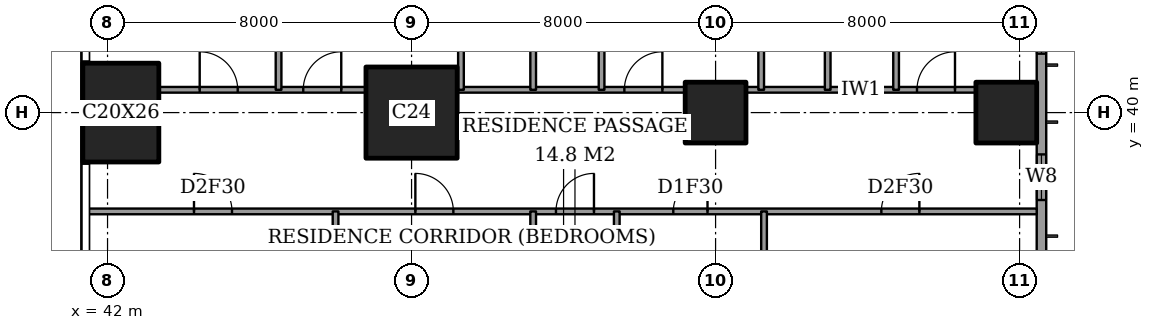
"""IFC4 building model, lengths in metres.
Left out: names, types, materials, properties, quantities, classifications, styles, units other than length and angle.
Written with IfcOpenShell. Run it as: python <this file> out.ifc"""

import sys

from ifc_helpers import new_model, si_unit, direction, frame, frame_2d, origin, origin_2d, place, context, subcontext, project, spatial, rectangle, extrude, element, fill, save


model = new_model("IFC4")
c1 = context("Model", 3, precision=1e-05, world=origin(), true_north=direction((0.0, 1.0)))
c2 = subcontext(c1, "Body", "Model", "MODEL_VIEW")
j1 = project(units=[si_unit("LENGTHUNIT", "METRE"), si_unit("PLANEANGLEUNIT", "RADIAN")], contexts=[c1])
p1 = place(None, origin())
s1 = spatial("IfcSite", under=j1, at=p1, CompositionType="ELEMENT")
p2 = place(p1, origin())
s2 = spatial("IfcBuilding", under=s1, at=p2, CompositionType="ELEMENT")
p3 = place(p2, frame((0.0, 0.0, 273.6)))
s3 = spatial("IfcBuildingStorey", under=s2, at=p3, CompositionType="ELEMENT", Elevation=273.6)
p4 = place(p3, frame((42.35, 40.0, 0.0), z_axis=(0.0, 0.0, 1.0), x_axis=(1.0, 0.0, 0.0)))
e1 = element("IfcColumn", 1, at=p4, inside=s3, PredefinedType="COLUMN", context=c2, shape_type="SweptSolid", body=[
    extrude(rectangle(XDim=2.0, YDim=2.6, at=origin_2d()), origin(), (0.0, 0.0, 1.0), 3.6),
])
p5 = place(p3, frame((50.0, 40.0, 0.0), z_axis=(0.0, 0.0, 1.0), x_axis=(1.0, 0.0, 0.0)))
e2 = element("IfcColumn", 2, at=p5, inside=s3, PredefinedType="COLUMN", context=c2, shape_type="SweptSolid", body=[
    extrude(rectangle(XDim=2.4, YDim=2.4, at=origin_2d()), origin(), (0.0, 0.0, 1.0), 3.6),
])
for number, where, z_axis, x_axis in (
    (3, (58.0, 40.0, 0.0), (0.0, 0.0, 1.0), (1.0, 0.0, 0.0)),
    (4, (65.65, 40.0, 0.0), (0.0, 0.0, 1.0), (1.0, 0.0, 0.0)),
):
    element("IfcColumn", number, at=place(p3, frame(where, z_axis=z_axis, x_axis=x_axis)), inside=s3, PredefinedType="COLUMN", context=c2, shape_type="SweptSolid", body=[
        extrude(rectangle(XDim=1.6, YDim=1.6, at=origin_2d()), origin(), (0.0, 0.0, 1.0), 3.6),
    ])
p6 = place(p3, frame((66.575, 3.175, 0.0), z_axis=(0.0, 0.0, 1.0), x_axis=(0.0, 1.0, 0.0)))
e5 = element("IfcWall", 5, at=p6, inside=s3, PredefinedType="SOLIDWALL", context=c2, shape_type="SweptSolid", body=[
    extrude(rectangle(XDim=41.65, YDim=0.25, at=frame_2d((20.825, 0.0))), origin(), (0.0, 0.0, 1.0), 3.6),
])
p7 = place(p6, frame((0.875, 0.0, 0.6)))
e6 = element("IfcOpeningElement", 6, at=p7, cuts=e5, PredefinedType="OPENING", context=c2, shape_type="SweptSolid", body=[
    extrude(rectangle(XDim=2.4, YDim=2.0, at=frame_2d((1.2, 1.0))), frame((0.0, 0.135, 0.0), z_axis=(0.0, -1.0, 0.0), x_axis=(1.0, 0.0, 0.0)), (0.0, 0.0, 1.0), 0.27),
])
p8 = place(p6, frame((6.0, 0.0, 0.6)))
e7 = element("IfcOpeningElement", 7, at=p8, cuts=e5, PredefinedType="OPENING", context=c2, shape_type="SweptSolid", body=[
    extrude(rectangle(XDim=1.2, YDim=2.0, at=frame_2d((0.6, 1.0))), frame((0.0, 0.135, 0.0), z_axis=(0.0, -1.0, 0.0), x_axis=(1.0, 0.0, 0.0)), (0.0, 0.0, 1.0), 0.27),
])
p9 = place(p6, frame((8.525, 0.0, 0.6)))
e8 = element("IfcOpeningElement", 8, at=p9, cuts=e5, PredefinedType="OPENING", context=c2, shape_type="SweptSolid", body=[
    extrude(rectangle(XDim=2.4, YDim=2.0, at=frame_2d((1.2, 1.0))), frame((0.0, 0.135, 0.0), z_axis=(0.0, -1.0, 0.0), x_axis=(1.0, 0.0, 0.0)), (0.0, 0.0, 1.0), 0.27),
])
p10 = place(p6, frame((15.725, 0.0, 0.6)))
e9 = element("IfcOpeningElement", 9, at=p10, cuts=e5, PredefinedType="OPENING", context=c2, shape_type="SweptSolid", body=[
    extrude(rectangle(XDim=2.4, YDim=2.0, at=frame_2d((1.2, 1.0))), frame((0.0, 0.135, 0.0), z_axis=(0.0, -1.0, 0.0), x_axis=(1.0, 0.0, 0.0)), (0.0, 0.0, 1.0), 0.27),
])
p11 = place(p6, frame((23.625, 0.0, 0.6)))
e10 = element("IfcOpeningElement", 10, at=p11, cuts=e5, PredefinedType="OPENING", context=c2, shape_type="SweptSolid", body=[
    extrude(rectangle(XDim=2.4, YDim=2.0, at=frame_2d((1.2, 1.0))), frame((0.0, 0.135, 0.0), z_axis=(0.0, -1.0, 0.0), x_axis=(1.0, 0.0, 0.0)), (0.0, 0.0, 1.0), 0.27),
])
p12 = place(p6, frame((30.725, 0.0, 0.6)))
e11 = element("IfcOpeningElement", 11, at=p12, cuts=e5, PredefinedType="OPENING", context=c2, shape_type="SweptSolid", body=[
    extrude(rectangle(XDim=2.4, YDim=2.0, at=frame_2d((1.2, 1.0))), frame((0.0, 0.135, 0.0), z_axis=(0.0, -1.0, 0.0), x_axis=(1.0, 0.0, 0.0)), (0.0, 0.0, 1.0), 0.27),
])
p13 = place(p6, frame((34.525, 0.0, 0.6)))
e12 = element("IfcOpeningElement", 12, at=p13, cuts=e5, PredefinedType="OPENING", context=c2, shape_type="SweptSolid", body=[
    extrude(rectangle(XDim=1.2, YDim=2.0, at=frame_2d((0.6, 1.0))), frame((0.0, 0.135, 0.0), z_axis=(0.0, -1.0, 0.0), x_axis=(1.0, 0.0, 0.0)), (0.0, 0.0, 1.0), 0.27),
])
p14 = place(p6, frame((38.375, 0.0, 0.6)))
e13 = element("IfcOpeningElement", 13, at=p14, cuts=e5, PredefinedType="OPENING", context=c2, shape_type="SweptSolid", body=[
    extrude(rectangle(XDim=2.4, YDim=2.0, at=frame_2d((1.2, 1.0))), frame((0.0, 0.135, 0.0), z_axis=(0.0, -1.0, 0.0), x_axis=(1.0, 0.0, 0.0)), (0.0, 0.0, 1.0), 0.27),
])
p15 = place(p3, frame((41.439, 37.4, 0.0), z_axis=(0.0, 0.0, 1.0), x_axis=(1.0, 0.0, 0.0)))
e14 = element("IfcWall", 14, at=p15, inside=s3, PredefinedType="PARTITIONING", context=c2, shape_type="SweptSolid", body=[
    extrude(rectangle(XDim=25.011, YDim=0.15, at=frame_2d((12.505, 0.0))), origin(), (0.0, 0.0, 1.0), 3.25),
])
p16 = place(p15, frame((12.361, 0.0, 0.0)))
e15 = element("IfcOpeningElement", 15, at=p16, cuts=e14, PredefinedType="OPENING", context=c2, shape_type="SweptSolid", body=[
    extrude(rectangle(XDim=1.0, YDim=2.1, at=frame_2d((0.5, 1.05))), frame((0.0, 0.085, 0.0), z_axis=(0.0, -1.0, 0.0), x_axis=(1.0, 0.0, 0.0)), (0.0, 0.0, 1.0), 0.17),
])
p17 = place(p15, frame((20.924, 0.0, 0.0)))
e16 = element("IfcOpeningElement", 16, at=p17, cuts=e14, PredefinedType="OPENING", context=c2, shape_type="SweptSolid", body=[
    extrude(rectangle(XDim=1.0, YDim=2.1, at=frame_2d((0.5, 1.05))), frame((0.0, 0.085, 0.0), z_axis=(0.0, -1.0, 0.0), x_axis=(1.0, 0.0, 0.0)), (0.0, 0.0, 1.0), 0.17),
])
p18 = place(p15, frame((15.448, 0.0, 0.0)))
e17 = element("IfcOpeningElement", 17, at=p18, cuts=e14, PredefinedType="OPENING", context=c2, shape_type="SweptSolid", body=[
    extrude(rectangle(XDim=0.9, YDim=2.1, at=frame_2d((0.45, 1.05))), frame((0.0, 0.085, 0.0), z_axis=(0.0, -1.0, 0.0), x_axis=(1.0, 0.0, 0.0)), (0.0, 0.0, 1.0), 0.17),
])
p19 = place(p15, frame((8.661, 0.0, 0.0)))
e18 = element("IfcOpeningElement", 18, at=p19, cuts=e14, PredefinedType="OPENING", context=c2, shape_type="SweptSolid", body=[
    extrude(rectangle(XDim=1.0, YDim=2.1, at=frame_2d((0.5, 1.05))), frame((0.0, 0.085, 0.0), z_axis=(0.0, -1.0, 0.0), x_axis=(1.0, 0.0, 0.0)), (0.0, 0.0, 1.0), 0.17),
])
p20 = place(p15, frame((2.836, 0.0, 0.0)))
e19 = element("IfcOpeningElement", 19, at=p20, cuts=e14, PredefinedType="OPENING", context=c2, shape_type="SweptSolid", body=[
    extrude(rectangle(XDim=1.0, YDim=2.1, at=frame_2d((0.5, 1.05))), frame((0.0, 0.085, 0.0), z_axis=(0.0, -1.0, 0.0), x_axis=(1.0, 0.0, 0.0)), (0.0, 0.0, 1.0), 0.17),
])
p21 = place(p3, frame((43.35, 40.6, 0.0), z_axis=(0.0, 0.0, 1.0), x_axis=(1.0, 0.0, 0.0)))
e20 = element("IfcWall", 20, at=p21, inside=s3, PredefinedType="PARTITIONING", context=c2, shape_type="SweptSolid", body=[
    extrude(rectangle(XDim=5.45, YDim=0.15, at=frame_2d((2.725, 0.0))), origin(), (0.0, 0.0, 1.0), 3.25),
])
p22 = place(p21, frame((3.8, 0.0, 0.0)))
e21 = element("IfcOpeningElement", 21, at=p22, cuts=e20, PredefinedType="OPENING", context=c2, shape_type="SweptSolid", body=[
    extrude(rectangle(XDim=1.0, YDim=2.1, at=frame_2d((0.5, 1.05))), frame((0.0, 0.085, 0.0), z_axis=(0.0, -1.0, 0.0), x_axis=(1.0, 0.0, 0.0)), (0.0, 0.0, 1.0), 0.17),
])
p23 = place(p21, frame((1.075, 0.0, 0.0)))
e22 = element("IfcOpeningElement", 22, at=p23, cuts=e20, PredefinedType="OPENING", context=c2, shape_type="SweptSolid", body=[
    extrude(rectangle(XDim=1.0, YDim=2.1, at=frame_2d((0.5, 1.05))), frame((0.0, 0.085, 0.0), z_axis=(0.0, -1.0, 0.0), x_axis=(1.0, 0.0, 0.0)), (0.0, 0.0, 1.0), 0.17),
])
p24 = place(p3, frame((51.2, 40.6, 0.0), z_axis=(0.0, 0.0, 1.0), x_axis=(1.0, 0.0, 0.0)))
e23 = element("IfcWall", 23, at=p24, inside=s3, PredefinedType="PARTITIONING", context=c2, shape_type="SweptSolid", body=[
    extrude(rectangle(XDim=6.0, YDim=0.15, at=frame_2d((3.0, 0.0))), origin(), (0.0, 0.0, 1.0), 3.25),
])
p25 = place(p24, frame((4.4, 0.0, 0.0)))
e24 = element("IfcOpeningElement", 24, at=p25, cuts=e23, PredefinedType="OPENING", context=c2, shape_type="SweptSolid", body=[
    extrude(rectangle(XDim=1.0, YDim=2.1, at=frame_2d((0.5, 1.05))), frame((0.0, 0.085, 0.0), z_axis=(0.0, -1.0, 0.0), x_axis=(1.0, 0.0, 0.0)), (0.0, 0.0, 1.0), 0.17),
])
p26 = place(p3, frame((58.8, 40.6, 0.0), z_axis=(0.0, 0.0, 1.0), x_axis=(1.0, 0.0, 0.0)))
e25 = element("IfcWall", 25, at=p26, inside=s3, PredefinedType="PARTITIONING", context=c2, shape_type="SweptSolid", body=[
    extrude(rectangle(XDim=6.05, YDim=0.15, at=frame_2d((3.025, 0.0))), origin(), (0.0, 0.0, 1.0), 3.25),
])
p27 = place(p26, frame((4.5, 0.0, 0.0)))
e26 = element("IfcOpeningElement", 26, at=p27, cuts=e25, PredefinedType="OPENING", context=c2, shape_type="SweptSolid", body=[
    extrude(rectangle(XDim=1.0, YDim=2.1, at=frame_2d((0.5, 1.05))), frame((0.0, 0.085, 0.0), z_axis=(0.0, -1.0, 0.0), x_axis=(1.0, 0.0, 0.0)), (0.0, 0.0, 1.0), 0.17),
])
p28 = place(p3, frame((46.5, 40.6, 0.0), z_axis=(0.0, 0.0, 1.0), x_axis=(0.0, 1.0, 0.0)))
e27 = element("IfcWall", 27, at=p28, inside=s3, PredefinedType="PARTITIONING", context=c2, shape_type="SweptSolid", body=[
    extrude(rectangle(XDim=7.85, YDim=0.15, at=frame_2d((3.925, 0.0))), origin(), (0.0, 0.0, 1.0), 3.25),
])
p29 = place(p3, frame((48.0, 28.0, 0.0), z_axis=(0.0, 0.0, 1.0), x_axis=(0.0, 1.0, 0.0)))
e28 = element("IfcWall", 28, at=p29, inside=s3, PredefinedType="PARTITIONING", context=c2, shape_type="SweptSolid", body=[
    extrude(rectangle(XDim=9.4, YDim=0.15, at=frame_2d((4.7, 0.0))), origin(), (0.0, 0.0, 1.0), 3.25),
])
p30 = place(p29, frame((0.837, 0.0, 0.0)))
e29 = element("IfcOpeningElement", 29, at=p30, cuts=e28, PredefinedType="OPENING", context=c2, shape_type="SweptSolid", body=[
    extrude(rectangle(XDim=1.0, YDim=2.1, at=frame_2d((0.5, 1.05))), frame((0.0, 0.085, 0.0), z_axis=(0.0, -1.0, 0.0), x_axis=(1.0, 0.0, 0.0)), (0.0, 0.0, 1.0), 0.17),
])
p31 = place(p3, frame((51.3, 40.6, 0.0), z_axis=(0.0, 0.0, 1.0), x_axis=(0.0, 1.0, 0.0)))
e30 = element("IfcWall", 30, at=p31, inside=s3, PredefinedType="PARTITIONING", context=c2, shape_type="SweptSolid", body=[
    extrude(rectangle(XDim=7.85, YDim=0.15, at=frame_2d((3.925, 0.0))), origin(), (0.0, 0.0, 1.0), 3.25),
])
p32 = place(p31, frame((3.475, 0.0, 0.0)))
e31 = element("IfcOpeningElement", 31, at=p32, cuts=e30, PredefinedType="OPENING", context=c2, shape_type="SweptSolid", body=[
    extrude(rectangle(XDim=0.9, YDim=2.1, at=frame_2d((0.45, 1.05))), frame((0.0, 0.085, 0.0), z_axis=(0.0, -1.0, 0.0), x_axis=(1.0, 0.0, 0.0)), (0.0, 0.0, 1.0), 0.17),
])
p33 = place(p3, frame((53.2, 30.675, 0.0), z_axis=(0.0, 0.0, 1.0), x_axis=(0.0, 1.0, 0.0)))
e32 = element("IfcWall", 32, at=p33, inside=s3, PredefinedType="PARTITIONING", context=c2, shape_type="SweptSolid", body=[
    extrude(rectangle(XDim=6.725, YDim=0.15, at=frame_2d((3.362, 0.0))), origin(), (0.0, 0.0, 1.0), 3.25),
])
p34 = place(p3, frame((53.2, 40.6, 0.0), z_axis=(0.0, 0.0, 1.0), x_axis=(0.0, 1.0, 0.0)))
e33 = element("IfcWall", 33, at=p34, inside=s3, PredefinedType="PARTITIONING", context=c2, shape_type="SweptSolid", body=[
    extrude(rectangle(XDim=7.85, YDim=0.15, at=frame_2d((3.925, 0.0))), origin(), (0.0, 0.0, 1.0), 3.25),
])
p35 = place(p3, frame((55.0, 40.6, 0.0), z_axis=(0.0, 0.0, 1.0), x_axis=(0.0, 1.0, 0.0)))
e34 = element("IfcWall", 34, at=p35, inside=s3, PredefinedType="PARTITIONING", context=c2, shape_type="SweptSolid", body=[
    extrude(rectangle(XDim=7.85, YDim=0.15, at=frame_2d((3.925, 0.0))), origin(), (0.0, 0.0, 1.0), 3.25),
])
p36 = place(p35, frame((3.475, 0.0, 0.0)))
e35 = element("IfcOpeningElement", 35, at=p36, cuts=e34, PredefinedType="OPENING", context=c2, shape_type="SweptSolid", body=[
    extrude(rectangle(XDim=0.9, YDim=2.1, at=frame_2d((0.45, 1.05))), frame((0.0, 0.085, 0.0), z_axis=(0.0, -1.0, 0.0), x_axis=(1.0, 0.0, 0.0)), (0.0, 0.0, 1.0), 0.17),
])
p37 = place(p3, frame((55.4, 28.0, 0.0), z_axis=(0.0, 0.0, 1.0), x_axis=(0.0, 1.0, 0.0)))
e36 = element("IfcWall", 36, at=p37, inside=s3, PredefinedType="PARTITIONING", context=c2, shape_type="SweptSolid", body=[
    extrude(rectangle(XDim=9.4, YDim=0.15, at=frame_2d((4.7, 0.0))), origin(), (0.0, 0.0, 1.0), 3.25),
])
p38 = place(p37, frame((0.837, 0.0, 0.0)))
e37 = element("IfcOpeningElement", 37, at=p38, cuts=e36, PredefinedType="OPENING", context=c2, shape_type="SweptSolid", body=[
    extrude(rectangle(XDim=1.0, YDim=2.1, at=frame_2d((0.5, 1.05))), frame((0.0, 0.085, 0.0), z_axis=(0.0, -1.0, 0.0), x_axis=(1.0, 0.0, 0.0)), (0.0, 0.0, 1.0), 0.17),
])
p39 = place(p3, frame((59.2, 40.6, 0.0), z_axis=(0.0, 0.0, 1.0), x_axis=(0.0, 1.0, 0.0)))
e38 = element("IfcWall", 38, at=p39, inside=s3, PredefinedType="PARTITIONING", context=c2, shape_type="SweptSolid", body=[
    extrude(rectangle(XDim=7.85, YDim=0.15, at=frame_2d((3.925, 0.0))), origin(), (0.0, 0.0, 1.0), 3.25),
])
p40 = place(p3, frame((59.275, 33.2, 0.0), z_axis=(0.0, 0.0, 1.0), x_axis=(0.0, 1.0, 0.0)))
e39 = element("IfcWall", 39, at=p40, inside=s3, PredefinedType="PARTITIONING", context=c2, shape_type="SweptSolid", body=[
    extrude(rectangle(XDim=4.2, YDim=0.15, at=frame_2d((2.1, 0.0))), origin(), (0.0, 0.0, 1.0), 3.25),
])
p41 = place(p3, frame((60.95, 40.6, 0.0), z_axis=(0.0, 0.0, 1.0), x_axis=(0.0, 1.0, 0.0)))
e40 = element("IfcWall", 40, at=p41, inside=s3, PredefinedType="PARTITIONING", context=c2, shape_type="SweptSolid", body=[
    extrude(rectangle(XDim=7.85, YDim=0.15, at=frame_2d((3.925, 0.0))), origin(), (0.0, 0.0, 1.0), 3.25),
])
p42 = place(p41, frame((5.225, 0.0, 0.0)))
e41 = element("IfcOpeningElement", 41, at=p42, cuts=e40, PredefinedType="OPENING", context=c2, shape_type="SweptSolid", body=[
    extrude(rectangle(XDim=0.9, YDim=2.1, at=frame_2d((0.45, 1.05))), frame((0.0, 0.085, 0.0), z_axis=(0.0, -1.0, 0.0), x_axis=(1.0, 0.0, 0.0)), (0.0, 0.0, 1.0), 0.17),
])
p43 = place(p3, frame((62.75, 40.6, 0.0), z_axis=(0.0, 0.0, 1.0), x_axis=(0.0, 1.0, 0.0)))
e42 = element("IfcWall", 42, at=p43, inside=s3, PredefinedType="PARTITIONING", context=c2, shape_type="SweptSolid", body=[
    extrude(rectangle(XDim=3.5, YDim=0.15, at=frame_2d((1.75, 0.0))), origin(), (0.0, 0.0, 1.0), 3.25),
])
p44 = place(p43, frame((1.3, 0.0, 0.0)))
e43 = element("IfcOpeningElement", 43, at=p44, cuts=e42, PredefinedType="OPENING", context=c2, shape_type="SweptSolid", body=[
    extrude(rectangle(XDim=0.9, YDim=2.1, at=frame_2d((0.45, 1.05))), frame((0.0, 0.085, 0.0), z_axis=(0.0, -1.0, 0.0), x_axis=(1.0, 0.0, 0.0)), (0.0, 0.0, 1.0), 0.17),
])
p45 = place(p13, origin())
e44 = element("IfcWindow", 44, at=p45, inside=s3, PartitioningType="SINGLE_PANEL", PredefinedType="WINDOW", context=c2, shape_type="SweptSolid", body=[
    extrude(rectangle(XDim=1.2, YDim=2.0, at=frame_2d((0.6, 1.0))), frame((0.0, 0.03, 0.0), z_axis=(0.0, -1.0, 0.0), x_axis=(1.0, 0.0, 0.0)), (0.0, 0.0, 1.0), 0.06),
])
fill(e12, e44)
p46 = place(p14, origin())
e45 = element("IfcWindow", 45, at=p46, inside=s3, PartitioningType="SINGLE_PANEL", PredefinedType="WINDOW", context=c2, shape_type="SweptSolid", body=[
    extrude(rectangle(XDim=2.4, YDim=2.0, at=frame_2d((1.2, 1.0))), frame((0.0, 0.03, 0.0), z_axis=(0.0, -1.0, 0.0), x_axis=(1.0, 0.0, 0.0)), (0.0, 0.0, 1.0), 0.06),
])
fill(e13, e45)
p47 = place(p27, origin())
e46 = element("IfcDoor", 46, at=p47, inside=s3, OperationType="SINGLE_SWING_LEFT", PredefinedType="DOOR", context=c2, shape_type="SweptSolid", body=[
    extrude(rectangle(XDim=1.0, YDim=2.1, at=frame_2d((0.5, 1.05))), frame((0.0, 0.025, 0.0), z_axis=(0.0, -1.0, 0.0), x_axis=(1.0, 0.0, 0.0)), (0.0, 0.0, 1.0), 0.05),
])
fill(e26, e46)
p48 = place(p25, origin())
e47 = element("IfcDoor", 47, at=p48, inside=s3, OperationType="SINGLE_SWING_LEFT", PredefinedType="DOOR", context=c2, shape_type="SweptSolid", body=[
    extrude(rectangle(XDim=1.0, YDim=2.1, at=frame_2d((0.5, 1.05))), frame((0.0, 0.025, 0.0), z_axis=(0.0, -1.0, 0.0), x_axis=(1.0, 0.0, 0.0)), (0.0, 0.0, 1.0), 0.05),
])
fill(e24, e47)
p49 = place(p22, origin())
e48 = element("IfcDoor", 48, at=p49, inside=s3, OperationType="SINGLE_SWING_LEFT", PredefinedType="DOOR", context=c2, shape_type="SweptSolid", body=[
    extrude(rectangle(XDim=1.0, YDim=2.1, at=frame_2d((0.5, 1.05))), frame((0.0, 0.025, 0.0), z_axis=(0.0, -1.0, 0.0), x_axis=(1.0, 0.0, 0.0)), (0.0, 0.0, 1.0), 0.05),
])
fill(e21, e48)
p50 = place(p23, origin())
e49 = element("IfcDoor", 49, at=p50, inside=s3, OperationType="SINGLE_SWING_RIGHT", PredefinedType="DOOR", context=c2, shape_type="SweptSolid", body=[
    extrude(rectangle(XDim=1.0, YDim=2.1, at=frame_2d((0.5, 1.05))), frame((0.0, 0.025, 0.0), z_axis=(0.0, -1.0, 0.0), x_axis=(1.0, 0.0, 0.0)), (0.0, 0.0, 1.0), 0.05),
])
fill(e22, e49)
p51 = place(p16, origin())
e50 = element("IfcDoor", 50, at=p51, inside=s3, OperationType="SINGLE_SWING_LEFT", PredefinedType="DOOR", context=c2, shape_type="SweptSolid", body=[
    extrude(rectangle(XDim=1.0, YDim=2.1, at=frame_2d((0.5, 1.05))), frame((0.0, 0.025, 0.0), z_axis=(0.0, -1.0, 0.0), x_axis=(1.0, 0.0, 0.0)), (0.0, 0.0, 1.0), 0.05),
])
fill(e15, e50)
p52 = place(p17, origin())
e51 = element("IfcDoor", 51, at=p52, inside=s3, OperationType="SINGLE_SWING_LEFT", PredefinedType="DOOR", context=c2, shape_type="SweptSolid", body=[
    extrude(rectangle(XDim=1.0, YDim=2.1, at=frame_2d((0.5, 1.05))), frame((0.0, 0.025, 0.0), z_axis=(0.0, -1.0, 0.0), x_axis=(1.0, 0.0, 0.0)), (0.0, 0.0, 1.0), 0.05),
])
fill(e16, e51)
p53 = place(p18, origin())
e52 = element("IfcDoor", 52, at=p53, inside=s3, OperationType="SINGLE_SWING_LEFT", PredefinedType="DOOR", context=c2, shape_type="SweptSolid", body=[
    extrude(rectangle(XDim=0.9, YDim=2.1, at=frame_2d((0.45, 1.05))), frame((0.0, 0.025, 0.0), z_axis=(0.0, -1.0, 0.0), x_axis=(1.0, 0.0, 0.0)), (0.0, 0.0, 1.0), 0.05),
])
fill(e17, e52)
p54 = place(p19, origin())
e53 = element("IfcDoor", 53, at=p54, inside=s3, OperationType="SINGLE_SWING_RIGHT", PredefinedType="DOOR", context=c2, shape_type="SweptSolid", body=[
    extrude(rectangle(XDim=1.0, YDim=2.1, at=frame_2d((0.5, 1.05))), frame((0.0, 0.025, 0.0), z_axis=(0.0, -1.0, 0.0), x_axis=(1.0, 0.0, 0.0)), (0.0, 0.0, 1.0), 0.05),
])
fill(e18, e53)
p55 = place(p20, origin())
e54 = element("IfcDoor", 54, at=p55, inside=s3, OperationType="SINGLE_SWING_RIGHT", PredefinedType="DOOR", context=c2, shape_type="SweptSolid", body=[
    extrude(rectangle(XDim=1.0, YDim=2.1, at=frame_2d((0.5, 1.05))), frame((0.0, 0.025, 0.0), z_axis=(0.0, -1.0, 0.0), x_axis=(1.0, 0.0, 0.0)), (0.0, 0.0, 1.0), 0.05),
])
fill(e19, e54)
save(model, sys.argv[1])
